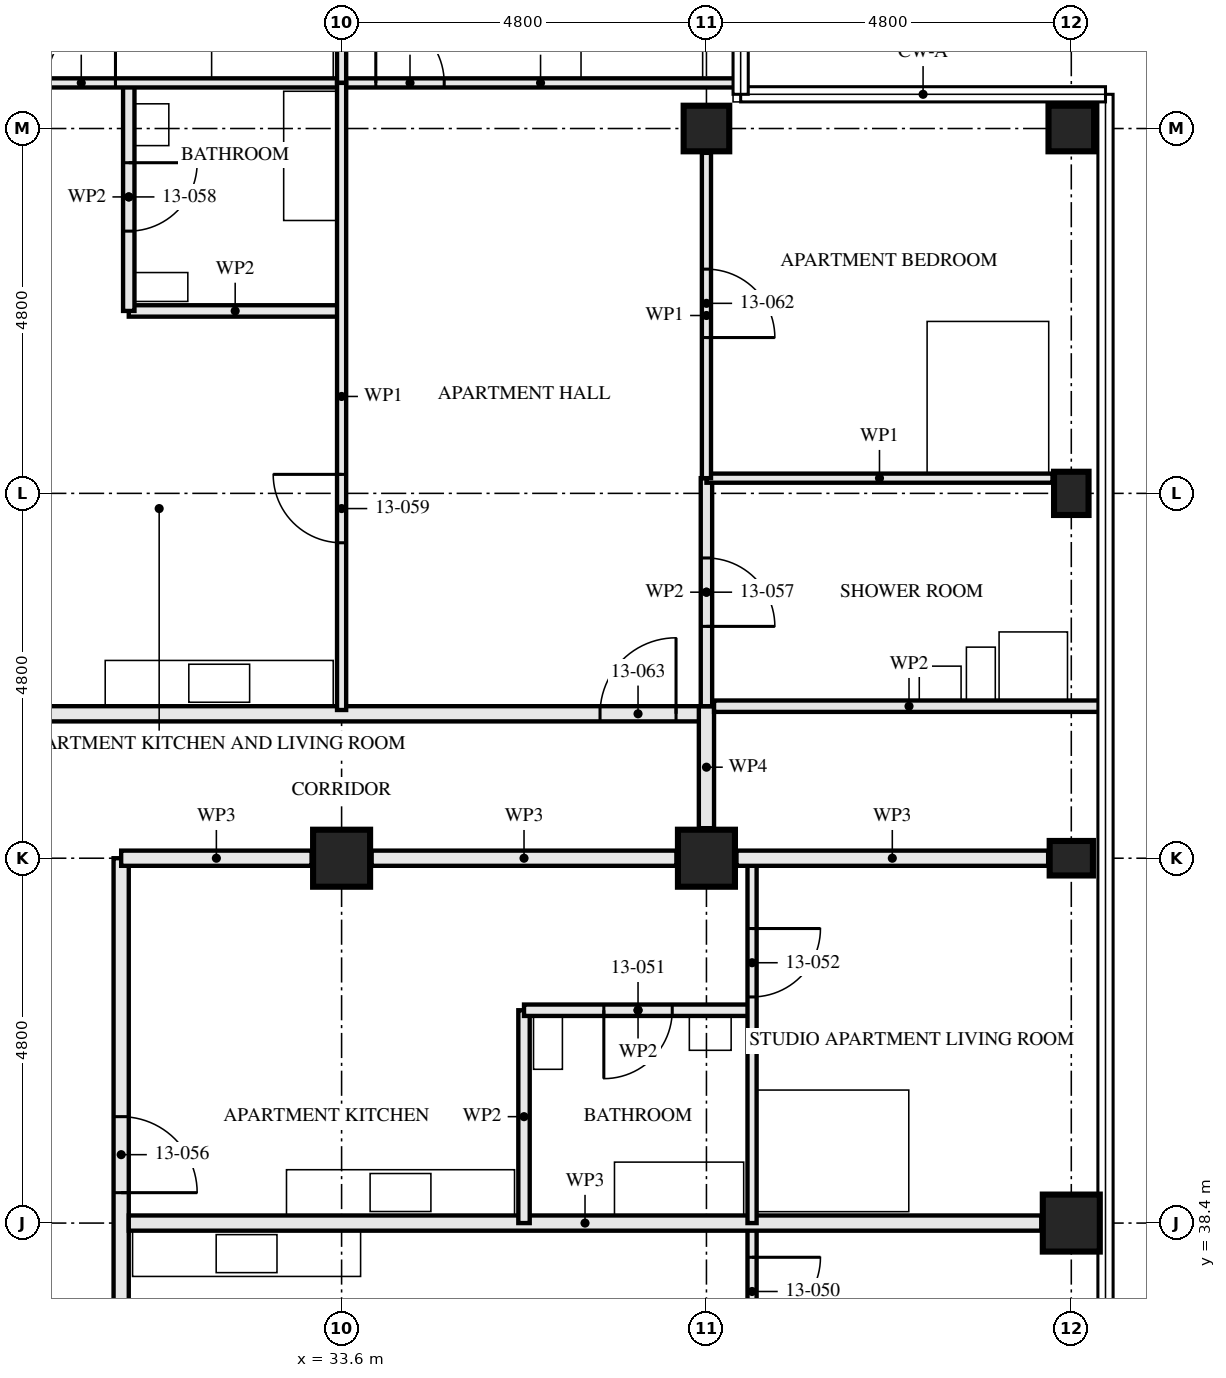
"""IFC4 building model, lengths in metres.
Left out: names, types, materials, properties, quantities, classifications, styles, units other than length and angle.
Written with IfcOpenShell. Run it as: python <this file> out.ifc"""

import sys

from ifc_helpers import new_model, si_unit, direction, frame, frame_2d, origin, origin_2d, place, context, subcontext, project, spatial, rectangle, hollow_rectangle, i_section, extrude, element, fill, save


model = new_model("IFC4")
c1 = context("Model", 3, precision=1e-05, world=origin(), true_north=direction((0.0, 1.0)))
c2 = subcontext(c1, "Body", "Model", "MODEL_VIEW")
j1 = project(units=[si_unit("LENGTHUNIT", "METRE"), si_unit("PLANEANGLEUNIT", "RADIAN")], contexts=[c1])
p1 = place(None, origin())
s1 = spatial("IfcSite", under=j1, at=p1, CompositionType="ELEMENT")
p2 = place(p1, origin())
s2 = spatial("IfcBuilding", under=s1, at=p2, CompositionType="ELEMENT")
p3 = place(p2, frame((0.0, 0.0, 51.5)))
s3 = spatial("IfcBuildingStorey", under=s2, at=p3, CompositionType="ELEMENT", Elevation=51.5)
for number, where, z_axis, x_axis in (
    (1, (33.6, 43.2, 0.0), (0.0, 0.0, 1.0), (0.0, 1.0, 0.0)),
    (2, (38.4, 43.2, 0.0), (0.0, 0.0, 1.0), (0.0, 1.0, 0.0)),
):
    element("IfcColumn", number, at=place(p3, frame(where, z_axis=z_axis, x_axis=x_axis)), inside=s3, PredefinedType="COLUMN", context=c2, shape_type="SweptSolid", body=[
        extrude(hollow_rectangle(XDim=0.75, YDim=0.75, WallThickness=0.08, at=origin_2d()), origin(), (0.0, 0.0, 1.0), 3.5),
    ])
p4 = place(p3, frame((38.4, 52.8, 0.0), z_axis=(0.0, 0.0, 1.0), x_axis=(0.0, 1.0, 0.0)))
e3 = element("IfcColumn", 3, at=p4, inside=s3, PredefinedType="COLUMN", context=c2, shape_type="SweptSolid", body=[
    extrude(hollow_rectangle(XDim=0.6, YDim=0.6, WallThickness=0.05, at=origin_2d()), origin(), (0.0, 0.0, 1.0), 3.5),
])
p5 = place(p3, frame((43.2, 38.4, 0.0), z_axis=(0.0, 0.0, 1.0), x_axis=(1.0, 0.0, 0.0)))
e4 = element("IfcColumn", 4, at=p5, inside=s3, PredefinedType="COLUMN", context=c2, shape_type="SweptSolid", body=[
    extrude(hollow_rectangle(XDim=0.75, YDim=0.75, WallThickness=0.08, at=origin_2d()), origin(), (0.0, 0.0, 1.0), 3.5),
])
for number, where, z_axis, x_axis in (
    (5, (43.2, 43.2, 0.0), (0.0, 0.0, 1.0), (0.0, 1.0, 0.0)),
    (6, (43.2, 48.0, 0.0), (0.0, 0.0, 1.0), (1.0, 0.0, 0.0)),
):
    element("IfcColumn", number, at=place(p3, frame(where, z_axis=z_axis, x_axis=x_axis)), inside=s3, PredefinedType="COLUMN", context=c2, shape_type="SweptSolid", body=[
        extrude(i_section(OverallWidth=0.454, OverallDepth=0.569, WebThickness=0.078, FlangeThickness=0.125, FilletRadius=0.015, at=origin_2d()), origin(), (0.0, 0.0, 1.0), 3.5),
    ])
p6 = place(p3, frame((43.2, 52.8, 0.0), z_axis=(0.0, 0.0, 1.0), x_axis=(0.0, 1.0, 0.0)))
e7 = element("IfcColumn", 7, at=p6, inside=s3, PredefinedType="COLUMN", context=c2, shape_type="SweptSolid", body=[
    extrude(hollow_rectangle(XDim=0.6, YDim=0.6, WallThickness=0.05, at=origin_2d()), origin(), (0.0, 0.0, 1.0), 3.5),
])
p7 = place(p3, frame((39.0, 33.6, 0.0), z_axis=(0.0, 0.0, 1.0), x_axis=(0.0, 1.0, 0.0)))
e8 = element("IfcWall", 8, at=p7, inside=s3, PredefinedType="PARTITIONING", context=c2, shape_type="SweptSolid", body=[
    extrude(rectangle(XDim=4.8, YDim=0.12, at=frame_2d((2.4, 0.0))), origin(), (0.0, 0.0, 1.0), 3.33),
])
p8 = place(p7, frame((3.45, 0.0, 0.0)))
e9 = element("IfcOpeningElement", 9, at=p8, cuts=e8, PredefinedType="OPENING", context=c2, shape_type="SweptSolid", body=[
    extrude(rectangle(XDim=0.9, YDim=2.1, at=frame_2d((0.45, 1.05))), frame((0.0, 0.071, 0.0), z_axis=(0.0, -1.0, 0.0), x_axis=(1.0, 0.0, 0.0)), (0.0, 0.0, 1.0), 0.141),
])
p9 = place(p3, frame((42.805, 38.4, 0.0), z_axis=(0.0, 0.0, 1.0), x_axis=(-1.0, 0.0, 0.0)))
e10 = element("IfcWall", 10, at=p9, inside=s3, PredefinedType="PARTITIONING", context=c2, shape_type="SweptSolid", body=[
    extrude(rectangle(XDim=12.005, YDim=0.2, at=frame_2d((6.002, 0.0))), origin(), (0.0, 0.0, 1.0), 2.55),
])
p10 = place(p3, frame((39.0, 41.2, 0.0), z_axis=(0.0, 0.0, 1.0), x_axis=(-1.0, 0.0, 0.0)))
e11 = element("IfcWall", 11, at=p10, inside=s3, PredefinedType="PARTITIONING", context=c2, shape_type="SweptSolid", body=[
    extrude(rectangle(XDim=3.0, YDim=0.15, at=frame_2d((1.5, 0.0))), origin(), (0.0, 0.0, 1.0), 3.33),
])
p11 = place(p10, frame((1.05, 0.0, 0.0)))
e12 = element("IfcOpeningElement", 12, at=p11, cuts=e11, PredefinedType="OPENING", context=c2, shape_type="SweptSolid", body=[
    extrude(rectangle(XDim=0.9, YDim=2.1, at=frame_2d((0.45, 1.05))), frame((0.0, 0.085, 0.0), z_axis=(0.0, -1.0, 0.0), x_axis=(1.0, 0.0, 0.0)), (0.0, 0.0, 1.0), 0.171),
])
p12 = place(p3, frame((36.0, 38.4, 0.0), z_axis=(0.0, 0.0, 1.0), x_axis=(0.0, 1.0, 0.0)))
e13 = element("IfcWall", 13, at=p12, inside=s3, PredefinedType="PARTITIONING", context=c2, shape_type="SweptSolid", body=[
    extrude(rectangle(XDim=2.8, YDim=0.15, at=frame_2d((1.4, 0.0))), origin(), (0.0, 0.0, 1.0), 3.33),
])
p13 = place(p3, frame((39.0, 38.4, 0.0), z_axis=(0.0, 0.0, 1.0), x_axis=(0.0, 1.0, 0.0)))
e14 = element("IfcWall", 14, at=p13, inside=s3, PredefinedType="PARTITIONING", context=c2, shape_type="SweptSolid", body=[
    extrude(rectangle(XDim=4.8, YDim=0.12, at=frame_2d((2.4, 0.0))), origin(), (0.0, 0.0, 1.0), 3.33),
])
p14 = place(p13, frame((2.975, 0.0, 0.0)))
e15 = element("IfcOpeningElement", 15, at=p14, cuts=e14, PredefinedType="OPENING", context=c2, shape_type="SweptSolid", body=[
    extrude(rectangle(XDim=0.9, YDim=2.1, at=frame_2d((0.45, 1.05))), frame((0.0, 0.071, 0.0), z_axis=(0.0, -1.0, 0.0), x_axis=(1.0, 0.0, 0.0)), (0.0, 0.0, 1.0), 0.141),
])
p15 = place(p3, frame((30.7, 28.8, 0.0), z_axis=(0.0, 0.0, 1.0), x_axis=(0.0, 1.0, 0.0)))
e16 = element("IfcWall", 16, at=p15, inside=s3, PredefinedType="PARTITIONING", context=c2, shape_type="SweptSolid", body=[
    extrude(rectangle(XDim=14.4, YDim=0.2, at=frame_2d((7.2, 0.0))), origin(), (0.0, 0.0, 1.0), 2.55),
])
p16 = place(p15, frame((1.4, 0.0, 0.0)))
e17 = element("IfcOpeningElement", 17, at=p16, cuts=e16, PredefinedType="OPENING", context=c2, shape_type="SweptSolid", body=[
    extrude(rectangle(XDim=1.0, YDim=2.1, at=frame_2d((0.5, 1.05))), frame((0.0, 0.111, 0.0), z_axis=(0.0, -1.0, 0.0), x_axis=(1.0, 0.0, 0.0)), (0.0, 0.0, 1.0), 0.221),
])
p17 = place(p15, frame((4.1, 0.0, 0.0)))
e18 = element("IfcOpeningElement", 18, at=p17, cuts=e16, PredefinedType="OPENING", context=c2, shape_type="SweptSolid", body=[
    extrude(rectangle(XDim=1.0, YDim=2.1, at=frame_2d((0.5, 1.05))), frame((0.0, 0.111, 0.0), z_axis=(0.0, -1.0, 0.0), x_axis=(1.0, 0.0, 0.0)), (0.0, 0.0, 1.0), 0.221),
])
p18 = place(p15, frame((5.975, 0.0, 0.0)))
e19 = element("IfcOpeningElement", 19, at=p18, cuts=e16, PredefinedType="OPENING", context=c2, shape_type="SweptSolid", body=[
    extrude(rectangle(XDim=1.0, YDim=2.1, at=frame_2d((0.5, 1.05))), frame((0.0, 0.111, 0.0), z_axis=(0.0, -1.0, 0.0), x_axis=(1.0, 0.0, 0.0)), (0.0, 0.0, 1.0), 0.221),
])
p19 = place(p15, frame((10.0, 0.0, 0.0)))
e20 = element("IfcOpeningElement", 20, at=p19, cuts=e16, PredefinedType="OPENING", context=c2, shape_type="SweptSolid", body=[
    extrude(rectangle(XDim=1.0, YDim=2.1, at=frame_2d((0.5, 1.05))), frame((0.0, 0.111, 0.0), z_axis=(0.0, -1.0, 0.0), x_axis=(1.0, 0.0, 0.0)), (0.0, 0.0, 1.0), 0.221),
])
p20 = place(p3, frame((38.4, 48.2, 0.0), z_axis=(0.0, 0.0, 1.0), x_axis=(0.0, -1.0, 0.0)))
e21 = element("IfcWall", 21, at=p20, inside=s3, PredefinedType="PARTITIONING", context=c2, shape_type="SweptSolid", body=[
    extrude(rectangle(XDim=3.0, YDim=0.15, at=frame_2d((1.5, 0.0))), origin(), (0.0, 0.0, 1.0), 2.55),
])
p21 = place(p20, frame((1.05, 0.0, 0.0)))
e22 = element("IfcOpeningElement", 22, at=p21, cuts=e21, PredefinedType="OPENING", context=c2, shape_type="SweptSolid", body=[
    extrude(rectangle(XDim=0.9, YDim=2.1, at=frame_2d((0.45, 1.05))), frame((0.0, 0.085, 0.0), z_axis=(0.0, -1.0, 0.0), x_axis=(1.0, 0.0, 0.0)), (0.0, 0.0, 1.0), 0.171),
])
p22 = place(p3, frame((30.8, 53.4, 0.0), z_axis=(0.0, 0.0, 1.0), x_axis=(0.0, -1.0, 0.0)))
e23 = element("IfcWall", 23, at=p22, inside=s3, PredefinedType="PARTITIONING", context=c2, shape_type="SweptSolid", body=[
    extrude(rectangle(XDim=3.0, YDim=0.15, at=frame_2d((1.5, 0.0))), origin(), (0.0, 0.0, 1.0), 2.55),
])
p23 = place(p22, frame((1.05, 0.0, 0.0)))
e24 = element("IfcOpeningElement", 24, at=p23, cuts=e23, PredefinedType="OPENING", context=c2, shape_type="SweptSolid", body=[
    extrude(rectangle(XDim=0.9, YDim=2.1, at=frame_2d((0.45, 1.05))), frame((0.0, 0.085, 0.0), z_axis=(0.0, -1.0, 0.0), x_axis=(1.0, 0.0, 0.0)), (0.0, 0.0, 1.0), 0.171),
])
p24 = place(p3, frame((33.6, 50.4, 0.0), z_axis=(0.0, 0.0, 1.0), x_axis=(-1.0, 0.0, 0.0)))
e25 = element("IfcWall", 25, at=p24, inside=s3, PredefinedType="PARTITIONING", context=c2, shape_type="SweptSolid", body=[
    extrude(rectangle(XDim=2.8, YDim=0.15, at=frame_2d((1.4, 0.0))), origin(), (0.0, 0.0, 1.0), 3.33),
])
p25 = place(p3, frame((33.6, 53.4, 0.0), z_axis=(0.0, 0.0, 1.0), x_axis=(0.0, -1.0, 0.0)))
e26 = element("IfcWall", 26, at=p25, inside=s3, PredefinedType="PARTITIONING", context=c2, shape_type="SweptSolid", body=[
    extrude(rectangle(XDim=8.25, YDim=0.12, at=frame_2d((4.125, 0.0))), origin(), (0.0, 0.0, 1.0), 2.55),
])
p26 = place(p25, frame((5.15, 0.0, 0.0)))
e27 = element("IfcOpeningElement", 27, at=p26, cuts=e26, PredefinedType="OPENING", context=c2, shape_type="SweptSolid", body=[
    extrude(rectangle(XDim=0.9, YDim=2.1, at=frame_2d((0.45, 1.05))), frame((0.0, 0.071, 0.0), z_axis=(0.0, -1.0, 0.0), x_axis=(1.0, 0.0, 0.0)), (0.0, 0.0, 1.0), 0.141),
])
p27 = place(p3, frame((42.953, 48.2, 0.0), z_axis=(0.0, 0.0, 1.0), x_axis=(-1.0, 0.0, 0.0)))
e28 = element("IfcWall", 28, at=p27, inside=s3, PredefinedType="PARTITIONING", context=c2, shape_type="SweptSolid", body=[
    extrude(rectangle(XDim=4.553, YDim=0.12, at=frame_2d((2.276, 0.0))), origin(), (0.0, 0.0, 1.0), 3.33),
])
p28 = place(p3, frame((38.835, 53.4, 0.0), z_axis=(0.0, 0.0, 1.0), x_axis=(-1.0, 0.0, 0.0)))
e29 = element("IfcWall", 29, at=p28, inside=s3, PredefinedType="PARTITIONING", context=c2, shape_type="SweptSolid", body=[
    extrude(rectangle(XDim=5.235, YDim=0.12, at=frame_2d((2.617, 0.0))), origin(), (0.0, 0.0, 1.0), 2.32),
])
p29 = place(p28, frame((3.885, 0.0, 0.0)))
e30 = element("IfcOpeningElement", 30, at=p29, cuts=e29, PredefinedType="OPENING", context=c2, shape_type="SweptSolid", body=[
    extrude(rectangle(XDim=0.9, YDim=2.1, at=frame_2d((0.45, 1.05))), frame((0.0, 0.071, 0.0), z_axis=(0.0, -1.0, 0.0), x_axis=(1.0, 0.0, 0.0)), (0.0, 0.0, 1.0), 0.141),
])
p30 = place(p3, frame((33.6, 53.4, 0.0), z_axis=(0.0, 0.0, 1.0), x_axis=(-1.0, 0.0, 0.0)))
e31 = element("IfcWall", 31, at=p30, inside=s3, PredefinedType="PARTITIONING", context=c2, shape_type="SweptSolid", body=[
    extrude(rectangle(XDim=4.8, YDim=0.12, at=frame_2d((2.4, 0.0))), origin(), (0.0, 0.0, 1.0), 3.33),
])
p31 = place(p30, frame((2.975, 0.0, 0.0)))
e32 = element("IfcOpeningElement", 32, at=p31, cuts=e31, PredefinedType="OPENING", context=c2, shape_type="SweptSolid", body=[
    extrude(rectangle(XDim=0.9, YDim=2.1, at=frame_2d((0.45, 1.05))), frame((0.0, 0.071, 0.0), z_axis=(0.0, -1.0, 0.0), x_axis=(1.0, 0.0, 0.0)), (0.0, 0.0, 1.0), 0.141),
])
p32 = place(p3, frame((38.4, 52.48, 0.0), z_axis=(0.0, 0.0, 1.0), x_axis=(0.0, -1.0, 0.0)))
e33 = element("IfcWall", 33, at=p32, inside=s3, PredefinedType="PARTITIONING", context=c2, shape_type="SweptSolid", body=[
    extrude(rectangle(XDim=4.28, YDim=0.12, at=frame_2d((2.14, 0.0))), origin(), (0.0, 0.0, 1.0), 3.33),
])
p33 = place(p32, frame((1.53, 0.0, 0.0)))
e34 = element("IfcOpeningElement", 34, at=p33, cuts=e33, PredefinedType="OPENING", context=c2, shape_type="SweptSolid", body=[
    extrude(rectangle(XDim=0.9, YDim=2.1, at=frame_2d((0.45, 1.05))), frame((0.0, 0.071, 0.0), z_axis=(0.0, -1.0, 0.0), x_axis=(1.0, 0.0, 0.0)), (0.0, 0.0, 1.0), 0.141),
])
p34 = place(p3, frame((33.6, 57.353, 0.0), z_axis=(0.0, 0.0, 1.0), x_axis=(0.0, -1.0, 0.0)))
e35 = element("IfcWall", 35, at=p34, inside=s3, PredefinedType="PARTITIONING", context=c2, shape_type="SweptSolid", body=[
    extrude(rectangle(XDim=3.953, YDim=0.12, at=frame_2d((1.977, 0.0))), origin(), (0.0, 0.0, 1.0), 3.33),
])
p35 = place(p3, frame((38.4, 45.1, 0.0), z_axis=(0.0, 0.0, 1.0), x_axis=(-1.0, 0.0, 0.0)))
e36 = element("IfcWall", 36, at=p35, inside=s3, PredefinedType="PARTITIONING", context=c2, shape_type="SweptSolid", body=[
    extrude(rectangle(XDim=9.6, YDim=0.2, at=frame_2d((4.8, 0.0))), origin(), (0.0, 0.0, 1.0), 3.33),
])
p36 = place(p35, frame((0.4, 0.0, 0.0)))
e37 = element("IfcOpeningElement", 37, at=p36, cuts=e36, PredefinedType="OPENING", context=c2, shape_type="SweptSolid", body=[
    extrude(rectangle(XDim=1.0, YDim=2.1, at=frame_2d((0.5, 1.05))), frame((0.0, 0.111, 0.0), z_axis=(0.0, -1.0, 0.0), x_axis=(1.0, 0.0, 0.0)), (0.0, 0.0, 1.0), 0.221),
])
p37 = place(p3, frame((38.4, 45.2, 0.0), z_axis=(0.0, 0.0, 1.0), x_axis=(0.0, -1.0, 0.0)))
e38 = element("IfcWall", 38, at=p37, inside=s3, PredefinedType="PARTITIONING", context=c2, shape_type="SweptSolid", body=[
    extrude(rectangle(XDim=1.605, YDim=0.2, at=frame_2d((0.802, 0.0))), origin(), (0.0, 0.0, 1.0), 3.33),
])
p38 = place(p3, frame((42.896, 43.2, 0.0), z_axis=(0.0, 0.0, 1.0), x_axis=(-1.0, 0.0, 0.0)))
e39 = element("IfcWall", 39, at=p38, inside=s3, PredefinedType="PARTITIONING", context=c2, shape_type="SweptSolid", body=[
    extrude(rectangle(XDim=4.101, YDim=0.2, at=frame_2d((2.05, 0.0))), origin(), (0.0, 0.0, 1.0), 2.32),
])
p39 = place(p3, frame((38.005, 43.2, 0.0), z_axis=(0.0, 0.0, 1.0), x_axis=(-1.0, 0.0, 0.0)))
e40 = element("IfcWall", 40, at=p39, inside=s3, PredefinedType="PARTITIONING", context=c2, shape_type="SweptSolid", body=[
    extrude(rectangle(XDim=4.01, YDim=0.2, at=frame_2d((2.005, 0.0))), origin(), (0.0, 0.0, 1.0), 2.32),
])
p40 = place(p3, frame((33.205, 43.2, 0.0), z_axis=(0.0, 0.0, 1.0), x_axis=(-1.0, 0.0, 0.0)))
e41 = element("IfcWall", 41, at=p40, inside=s3, PredefinedType="PARTITIONING", context=c2, shape_type="SweptSolid", body=[
    extrude(rectangle(XDim=2.505, YDim=0.2, at=frame_2d((1.252, 0.0))), origin(), (0.0, 0.0, 1.0), 2.32),
])
p41 = place(p3, frame((43.63, 45.2, 0.0), z_axis=(0.0, 0.0, 1.0), x_axis=(-1.0, 0.0, 0.0)))
e42 = element("IfcWall", 42, at=p41, inside=s3, PredefinedType="PARTITIONING", context=c2, shape_type="SweptSolid", body=[
    extrude(rectangle(XDim=5.13, YDim=0.15, at=frame_2d((2.565, 0.0))), origin(), (0.0, 0.0, 1.0), 2.32),
])
p42 = place(p8, frame((0.9, 0.0, 0.0), z_axis=(0.0, 0.0, 1.0), x_axis=(-1.0, 0.0, 0.0)))
e43 = element("IfcDoor", 43, at=p42, inside=s3, OperationType="SINGLE_SWING_RIGHT", PredefinedType="DOOR", context=c2, shape_type="SweptSolid", body=[
    extrude(rectangle(XDim=0.9, YDim=2.1, at=frame_2d((0.45, 1.05))), frame((0.0, 0.022, 0.0), z_axis=(0.0, -1.0, 0.0), x_axis=(1.0, 0.0, 0.0)), (0.0, 0.0, 1.0), 0.044),
])
fill(e9, e43)
p43 = place(p11, origin())
e44 = element("IfcDoor", 44, at=p43, inside=s3, OperationType="SINGLE_SWING_LEFT", PredefinedType="DOOR", context=c2, shape_type="SweptSolid", body=[
    extrude(rectangle(XDim=0.9, YDim=2.1, at=frame_2d((0.45, 1.05))), frame((0.0, 0.022, 0.0), z_axis=(0.0, -1.0, 0.0), x_axis=(1.0, 0.0, 0.0)), (0.0, 0.0, 1.0), 0.044),
])
fill(e12, e44)
p44 = place(p14, frame((0.9, 0.0, 0.0), z_axis=(0.0, 0.0, 1.0), x_axis=(-1.0, 0.0, 0.0)))
e45 = element("IfcDoor", 45, at=p44, inside=s3, OperationType="SINGLE_SWING_RIGHT", PredefinedType="DOOR", context=c2, shape_type="SweptSolid", body=[
    extrude(rectangle(XDim=0.9, YDim=2.1, at=frame_2d((0.45, 1.05))), frame((0.0, 0.022, 0.0), z_axis=(0.0, -1.0, 0.0), x_axis=(1.0, 0.0, 0.0)), (0.0, 0.0, 1.0), 0.044),
])
fill(e15, e45)
p45 = place(p19, frame((1.0, 0.0, 0.0), z_axis=(0.0, 0.0, 1.0), x_axis=(-1.0, 0.0, 0.0)))
e46 = element("IfcDoor", 46, at=p45, inside=s3, OperationType="SINGLE_SWING_LEFT", PredefinedType="DOOR", context=c2, shape_type="SweptSolid", body=[
    extrude(rectangle(XDim=1.0, YDim=2.1, at=frame_2d((0.5, 1.05))), frame((0.0, 0.027, 0.0), z_axis=(0.0, -1.0, 0.0), x_axis=(1.0, 0.0, 0.0)), (0.0, 0.0, 1.0), 0.054),
])
fill(e20, e46)
p46 = place(p21, origin())
e47 = element("IfcDoor", 47, at=p46, inside=s3, OperationType="SINGLE_SWING_LEFT", PredefinedType="DOOR", context=c2, shape_type="SweptSolid", body=[
    extrude(rectangle(XDim=0.9, YDim=2.1, at=frame_2d((0.45, 1.05))), frame((0.0, 0.022, 0.0), z_axis=(0.0, -1.0, 0.0), x_axis=(1.0, 0.0, 0.0)), (0.0, 0.0, 1.0), 0.044),
])
fill(e22, e47)
p47 = place(p23, origin())
e48 = element("IfcDoor", 48, at=p47, inside=s3, OperationType="SINGLE_SWING_RIGHT", PredefinedType="DOOR", context=c2, shape_type="SweptSolid", body=[
    extrude(rectangle(XDim=0.9, YDim=2.1, at=frame_2d((0.45, 1.05))), frame((0.0, 0.022, 0.0), z_axis=(0.0, -1.0, 0.0), x_axis=(1.0, 0.0, 0.0)), (0.0, 0.0, 1.0), 0.044),
])
fill(e24, e48)
p48 = place(p26, frame((0.9, 0.0, 0.0), z_axis=(0.0, 0.0, 1.0), x_axis=(-1.0, 0.0, 0.0)))
e49 = element("IfcDoor", 49, at=p48, inside=s3, OperationType="SINGLE_SWING_LEFT", PredefinedType="DOOR", context=c2, shape_type="SweptSolid", body=[
    extrude(rectangle(XDim=0.9, YDim=2.1, at=frame_2d((0.45, 1.05))), frame((0.0, 0.022, 0.0), z_axis=(0.0, -1.0, 0.0), x_axis=(1.0, 0.0, 0.0)), (0.0, 0.0, 1.0), 0.044),
])
fill(e27, e49)
p49 = place(p29, frame((0.9, 0.0, 0.0), z_axis=(0.0, 0.0, 1.0), x_axis=(-1.0, 0.0, 0.0)))
e50 = element("IfcDoor", 50, at=p49, inside=s3, OperationType="SINGLE_SWING_RIGHT", PredefinedType="DOOR", context=c2, shape_type="SweptSolid", body=[
    extrude(rectangle(XDim=0.9, YDim=2.1, at=frame_2d((0.45, 1.05))), frame((0.0, 0.022, 0.0), z_axis=(0.0, -1.0, 0.0), x_axis=(1.0, 0.0, 0.0)), (0.0, 0.0, 1.0), 0.044),
])
fill(e30, e50)
p50 = place(p31, frame((0.9, 0.0, 0.0), z_axis=(0.0, 0.0, 1.0), x_axis=(-1.0, 0.0, 0.0)))
e51 = element("IfcDoor", 51, at=p50, inside=s3, OperationType="SINGLE_SWING_LEFT", PredefinedType="DOOR", context=c2, shape_type="SweptSolid", body=[
    extrude(rectangle(XDim=0.9, YDim=2.1, at=frame_2d((0.45, 1.05))), frame((0.0, 0.022, 0.0), z_axis=(0.0, -1.0, 0.0), x_axis=(1.0, 0.0, 0.0)), (0.0, 0.0, 1.0), 0.044),
])
fill(e32, e51)
p51 = place(p33, origin())
e52 = element("IfcDoor", 52, at=p51, inside=s3, OperationType="SINGLE_SWING_LEFT", PredefinedType="DOOR", context=c2, shape_type="SweptSolid", body=[
    extrude(rectangle(XDim=0.9, YDim=2.1, at=frame_2d((0.45, 1.05))), frame((0.0, 0.022, 0.0), z_axis=(0.0, -1.0, 0.0), x_axis=(1.0, 0.0, 0.0)), (0.0, 0.0, 1.0), 0.044),
])
fill(e34, e52)
p52 = place(p36, frame((1.0, 0.0, 0.0), z_axis=(0.0, 0.0, 1.0), x_axis=(-1.0, 0.0, 0.0)))
e53 = element("IfcDoor", 53, at=p52, inside=s3, OperationType="SINGLE_SWING_LEFT", PredefinedType="DOOR", context=c2, shape_type="SweptSolid", body=[
    extrude(rectangle(XDim=1.0, YDim=2.1, at=frame_2d((0.5, 1.05))), frame((0.0, 0.027, 0.0), z_axis=(0.0, -1.0, 0.0), x_axis=(1.0, 0.0, 0.0)), (0.0, 0.0, 1.0), 0.054),
])
fill(e37, e53)
save(model, sys.argv[1])
